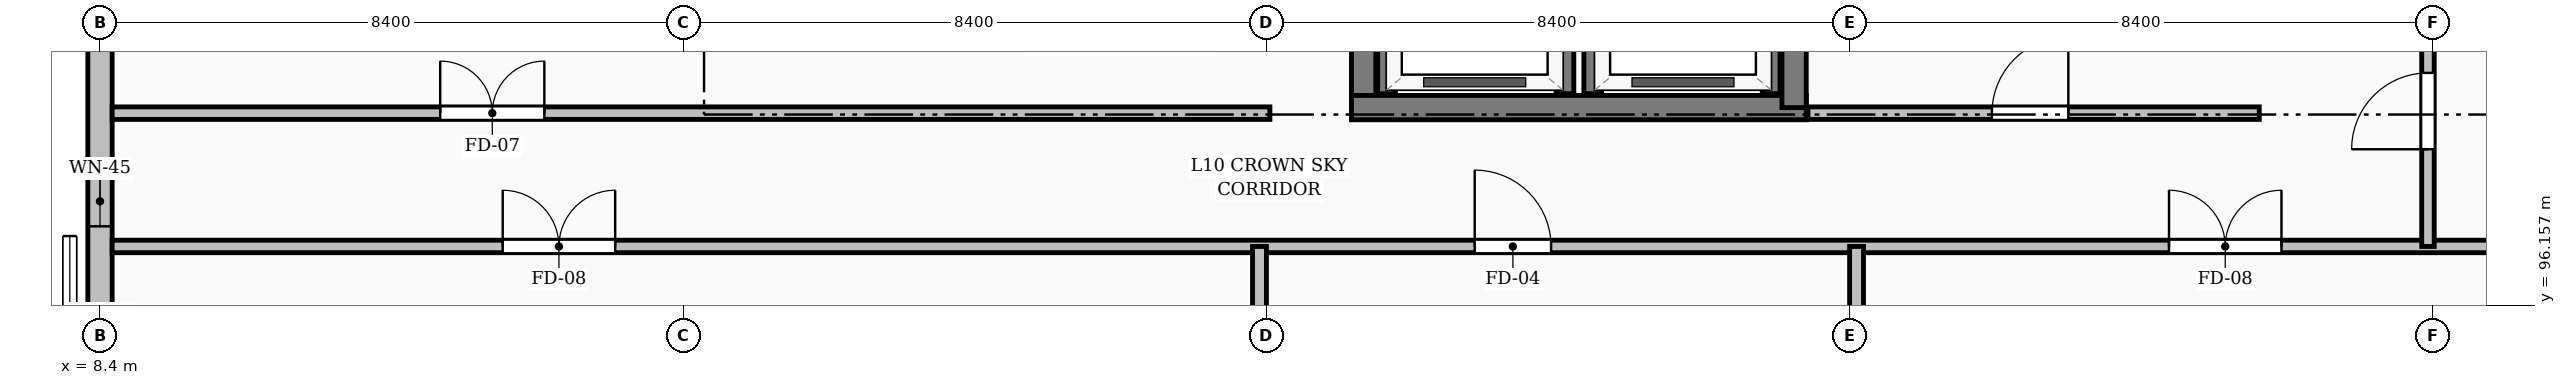
"""IFC4 building model, lengths in metres.
Left out: names, types, materials, properties, quantities, classifications, styles, units other than length and angle.
Written with IfcOpenShell. Run it as: python <this file> out.ifc"""

import sys

from ifc_helpers import new_model, si_unit, direction, frame, frame_2d, origin, place, context, subcontext, project, spatial, rectangle, extrude, element, fill, save


model = new_model("IFC4")
c1 = context("Model", 3, precision=1e-05, world=origin(), true_north=direction((0.0, 1.0)))
c2 = subcontext(c1, "Body", "Model", "MODEL_VIEW")
j1 = project(units=[si_unit("LENGTHUNIT", "METRE"), si_unit("PLANEANGLEUNIT", "RADIAN")], contexts=[c1])
p1 = place(None, origin())
s1 = spatial("IfcSite", under=j1, at=p1, CompositionType="ELEMENT")
p2 = place(p1, origin())
s2 = spatial("IfcBuilding", under=s1, at=p2, CompositionType="ELEMENT")
p3 = place(p2, frame((0.0, 0.0, 35.28)))
s3 = spatial("IfcBuildingStorey", under=s2, at=p3, CompositionType="ELEMENT", Elevation=35.28)
p4 = place(p3, frame((26.6, 99.0, 0.0), z_axis=(0.0, 0.0, 1.0), x_axis=(0.0, 1.0, 0.0)))
e1 = element("IfcWall", 1, at=p4, inside=s3, PredefinedType="SHEAR", context=c2, shape_type="SweptSolid", body=[
    extrude(rectangle(XDim=6.15, YDim=0.35, at=frame_2d((3.075, 0.0))), origin(), (0.0, 0.0, 1.0), 3.14),
])
p5 = place(p3, frame((26.425, 99.0, 0.0), z_axis=(0.0, 0.0, 1.0), x_axis=(1.0, 0.0, 0.0)))
e2 = element("IfcWall", 2, at=p5, inside=s3, PredefinedType="SHEAR", context=c2, shape_type="SweptSolid", body=[
    extrude(rectangle(XDim=6.55, YDim=0.35, at=frame_2d((3.275, 0.0))), origin(), (0.0, 0.0, 1.0), 3.14),
])
p6 = place(p3, frame((32.8, 99.0, 0.0), z_axis=(0.0, 0.0, 1.0), x_axis=(0.0, 1.0, 0.0)))
e3 = element("IfcWall", 3, at=p6, inside=s3, PredefinedType="SHEAR", context=c2, shape_type="SweptSolid", body=[
    extrude(rectangle(XDim=6.15, YDim=0.35, at=frame_2d((3.075, 0.0))), origin(), (0.0, 0.0, 1.0), 3.14),
])
p7 = place(p3, frame((8.4, 92.651, 0.0), z_axis=(0.0, 0.0, 1.0), x_axis=(0.0, 1.0, 0.0)))
e4 = element("IfcWall", 4, at=p7, inside=s3, PredefinedType="SOLIDWALL", context=c2, shape_type="SweptSolid", body=[
    extrude(rectangle(XDim=7.898, YDim=0.35, at=frame_2d((3.949, 0.0))), origin(), (0.0, 0.0, 1.0), 2.514),
])
p8 = place(p7, frame((2.539, 0.0, 0.3)))
e5 = element("IfcOpeningElement", 5, at=p8, cuts=e4, PredefinedType="OPENING", context=c2, shape_type="SweptSolid", body=[
    extrude(rectangle(XDim=0.72, YDim=1.85, at=frame_2d((0.36, 0.925))), frame((0.0, 0.185, 0.0), z_axis=(0.0, -1.0, 0.0), x_axis=(1.0, 0.0, 0.0)), (0.0, 0.0, 1.0), 0.37),
])
p9 = place(p7, frame((4.639, 0.0, 0.3)))
e6 = element("IfcOpeningElement", 6, at=p9, cuts=e4, PredefinedType="OPENING", context=c2, shape_type="SweptSolid", body=[
    extrude(rectangle(XDim=0.72, YDim=1.85, at=frame_2d((0.36, 0.925))), frame((0.0, 0.185, 0.0), z_axis=(0.0, -1.0, 0.0), x_axis=(1.0, 0.0, 0.0)), (0.0, 0.0, 1.0), 0.37),
])
for number, where, z_axis, x_axis in (
    (7, (26.93, 99.2, 0.0), (0.0, 0.0, 1.0), (0.0, 1.0, 0.0)),
    (8, (29.5, 99.2, 0.0), (0.0, 0.0, 1.0), (0.0, 1.0, 0.0)),
    (9, (29.9, 99.2, 0.0), (0.0, 0.0, 1.0), (0.0, 1.0, 0.0)),
    (10, (32.47, 99.2, 0.0), (0.0, 0.0, 1.0), (0.0, 1.0, 0.0)),
):
    element("IfcWall", number, at=place(p3, frame(where, z_axis=z_axis, x_axis=x_axis)), inside=s3, PredefinedType="SOLIDWALL", context=c2, shape_type="SweptSolid", body=[
        extrude(rectangle(XDim=2.2, YDim=0.255, at=frame_2d((1.1, 0.0))), origin(), (0.0, 0.0, 1.0), 3.14),
    ])
p10 = place(p3, frame((8.575, 97.0, 0.0), z_axis=(0.0, 0.0, 1.0), x_axis=(1.0, 0.0, 0.0)))
e11 = element("IfcWall", 11, at=p10, inside=s3, PredefinedType="PARTITIONING", context=c2, shape_type="SweptSolid", body=[
    extrude(rectangle(XDim=41.65, YDim=0.18, at=frame_2d((20.825, 0.0))), origin(), (0.0, 0.0, 1.0), 3.14),
])
p11 = place(p10, frame((5.625, 0.0, 0.0)))
e12 = element("IfcOpeningElement", 12, at=p11, cuts=e11, PredefinedType="OPENING", context=c2, shape_type="SweptSolid", body=[
    extrude(rectangle(XDim=1.62, YDim=2.2, at=frame_2d((0.81, 1.1))), frame((0.0, 0.1, 0.0), z_axis=(0.0, -1.0, 0.0), x_axis=(1.0, 0.0, 0.0)), (0.0, 0.0, 1.0), 0.2),
])
p12 = place(p10, frame((19.625, 0.0, 0.0)))
e13 = element("IfcOpeningElement", 13, at=p12, cuts=e11, PredefinedType="OPENING", context=c2, shape_type="SweptSolid", body=[
    extrude(rectangle(XDim=1.1, YDim=2.1, at=frame_2d((0.55, 1.05))), frame((0.0, 0.1, 0.0), z_axis=(0.0, -1.0, 0.0), x_axis=(1.0, 0.0, 0.0)), (0.0, 0.0, 1.0), 0.2),
])
p13 = place(p10, frame((29.625, 0.0, 0.0)))
e14 = element("IfcOpeningElement", 14, at=p13, cuts=e11, PredefinedType="OPENING", context=c2, shape_type="SweptSolid", body=[
    extrude(rectangle(XDim=1.62, YDim=2.2, at=frame_2d((0.81, 1.1))), frame((0.0, 0.1, 0.0), z_axis=(0.0, -1.0, 0.0), x_axis=(1.0, 0.0, 0.0)), (0.0, 0.0, 1.0), 0.2),
])
for number, where, z_axis, x_axis in (
    (15, (25.1, 92.65, 0.0), (0.0, 0.0, 1.0), (0.0, 1.0, 0.0)),
    (16, (33.7, 92.65, 0.0), (0.0, 0.0, 1.0), (0.0, 1.0, 0.0)),
):
    element("IfcWall", number, at=place(p3, frame(where, z_axis=z_axis, x_axis=x_axis)), inside=s3, PredefinedType="SOLIDWALL", context=c2, shape_type="SweptSolid", body=[
        extrude(rectangle(XDim=4.35, YDim=0.2, at=frame_2d((2.175, 0.0))), origin(), (0.0, 0.0, 1.0), 2.514),
    ])
p14 = place(p3, frame((8.575, 98.92, 0.0), z_axis=(0.0, 0.0, 1.0), x_axis=(1.0, 0.0, 0.0)))
e17 = element("IfcWall", 17, at=p14, inside=s3, PredefinedType="PARTITIONING", context=c2, shape_type="SweptSolid", body=[
    extrude(rectangle(XDim=16.675, YDim=0.18, at=frame_2d((8.337, 0.0))), origin(), (0.0, 0.0, 1.0), 3.14),
])
p15 = place(p14, frame((4.725, 0.0, 0.0)))
e18 = element("IfcOpeningElement", 18, at=p15, cuts=e17, PredefinedType="OPENING", context=c2, shape_type="SweptSolid", body=[
    extrude(rectangle(XDim=1.5, YDim=2.2, at=frame_2d((0.75, 1.1))), frame((0.0, 0.1, 0.0), z_axis=(0.0, -1.0, 0.0), x_axis=(1.0, 0.0, 0.0)), (0.0, 0.0, 1.0), 0.2),
])
p16 = place(p3, frame((33.0, 98.92, 0.0), z_axis=(0.0, 0.0, 1.0), x_axis=(1.0, 0.0, 0.0)))
e19 = element("IfcWall", 19, at=p16, inside=s3, PredefinedType="PARTITIONING", context=c2, shape_type="SweptSolid", body=[
    extrude(rectangle(XDim=6.5, YDim=0.18, at=frame_2d((3.25, 0.0))), origin(), (0.0, 0.0, 1.0), 3.14),
])
p17 = place(p16, frame((2.65, 0.0, 0.0)))
e20 = element("IfcOpeningElement", 20, at=p17, cuts=e19, PredefinedType="OPENING", context=c2, shape_type="SweptSolid", body=[
    extrude(rectangle(XDim=1.1, YDim=2.1, at=frame_2d((0.55, 1.05))), frame((0.0, 0.1, 0.0), z_axis=(0.0, -1.0, 0.0), x_axis=(1.0, 0.0, 0.0)), (0.0, 0.0, 1.0), 0.2),
])
p18 = place(p3, frame((41.93, 97.0, 0.0), z_axis=(0.0, 0.0, 1.0), x_axis=(0.0, 1.0, 0.0)))
e21 = element("IfcWall", 21, at=p18, inside=s3, PredefinedType="PARTITIONING", context=c2, shape_type="SweptSolid", body=[
    extrude(rectangle(XDim=4.42, YDim=0.18, at=frame_2d((2.21, 0.0))), origin(), (0.0, 0.0, 1.0), 2.514),
])
p19 = place(p18, frame((1.4, 0.0, 0.0)))
e22 = element("IfcOpeningElement", 22, at=p19, cuts=e21, PredefinedType="OPENING", context=c2, shape_type="SweptSolid", body=[
    extrude(rectangle(XDim=1.1, YDim=2.1, at=frame_2d((0.55, 1.05))), frame((0.0, 0.1, 0.0), z_axis=(0.0, -1.0, 0.0), x_axis=(1.0, 0.0, 0.0)), (0.0, 0.0, 1.0), 0.2),
])
p20 = place(p9, origin())
e23 = element("IfcWindow", 23, at=p20, inside=s3, PartitioningType="SINGLE_PANEL", PredefinedType="WINDOW", context=c2, shape_type="SweptSolid", body=[
    extrude(rectangle(XDim=0.72, YDim=1.85, at=frame_2d((0.36, 0.925))), frame((0.0, 0.03, 0.0), z_axis=(0.0, -1.0, 0.0), x_axis=(1.0, 0.0, 0.0)), (0.0, 0.0, 1.0), 0.06),
])
fill(e6, e23)
p21 = place(p11, origin())
e24 = element("IfcDoor", 24, at=p21, inside=s3, OperationType="DOUBLE_DOOR_SINGLE_SWING", PredefinedType="DOOR", context=c2, shape_type="SweptSolid", body=[
    extrude(rectangle(XDim=1.62, YDim=2.2, at=frame_2d((0.81, 1.1))), frame((0.0, 0.025, 0.0), z_axis=(0.0, -1.0, 0.0), x_axis=(1.0, 0.0, 0.0)), (0.0, 0.0, 1.0), 0.05),
])
fill(e12, e24)
p22 = place(p12, origin())
e25 = element("IfcDoor", 25, at=p22, inside=s3, OperationType="SINGLE_SWING_LEFT", PredefinedType="DOOR", context=c2, shape_type="SweptSolid", body=[
    extrude(rectangle(XDim=1.1, YDim=2.1, at=frame_2d((0.55, 1.05))), frame((0.0, 0.025, 0.0), z_axis=(0.0, -1.0, 0.0), x_axis=(1.0, 0.0, 0.0)), (0.0, 0.0, 1.0), 0.05),
])
fill(e13, e25)
p23 = place(p13, origin())
e26 = element("IfcDoor", 26, at=p23, inside=s3, OperationType="DOUBLE_DOOR_SINGLE_SWING", PredefinedType="DOOR", context=c2, shape_type="SweptSolid", body=[
    extrude(rectangle(XDim=1.62, YDim=2.2, at=frame_2d((0.81, 1.1))), frame((0.0, 0.025, 0.0), z_axis=(0.0, -1.0, 0.0), x_axis=(1.0, 0.0, 0.0)), (0.0, 0.0, 1.0), 0.05),
])
fill(e14, e26)
p24 = place(p15, origin())
e27 = element("IfcDoor", 27, at=p24, inside=s3, OperationType="DOUBLE_DOOR_SINGLE_SWING", PredefinedType="DOOR", context=c2, shape_type="SweptSolid", body=[
    extrude(rectangle(XDim=1.5, YDim=2.2, at=frame_2d((0.75, 1.1))), frame((0.0, 0.025, 0.0), z_axis=(0.0, -1.0, 0.0), x_axis=(1.0, 0.0, 0.0)), (0.0, 0.0, 1.0), 0.05),
])
fill(e18, e27)
p25 = place(p17, origin())
e28 = element("IfcDoor", 28, at=p25, inside=s3, OperationType="SINGLE_SWING_RIGHT", PredefinedType="DOOR", context=c2, shape_type="SweptSolid", body=[
    extrude(rectangle(XDim=1.1, YDim=2.1, at=frame_2d((0.55, 1.05))), frame((0.0, 0.025, 0.0), z_axis=(0.0, -1.0, 0.0), x_axis=(1.0, 0.0, 0.0)), (0.0, 0.0, 1.0), 0.05),
])
fill(e20, e28)
p26 = place(p19, origin())
e29 = element("IfcDoor", 29, at=p26, inside=s3, OperationType="SINGLE_SWING_LEFT", PredefinedType="DOOR", context=c2, shape_type="SweptSolid", body=[
    extrude(rectangle(XDim=1.1, YDim=2.1, at=frame_2d((0.55, 1.05))), frame((0.0, 0.025, 0.0), z_axis=(0.0, -1.0, 0.0), x_axis=(1.0, 0.0, 0.0)), (0.0, 0.0, 1.0), 0.05),
])
fill(e22, e29)
save(model, sys.argv[1])
